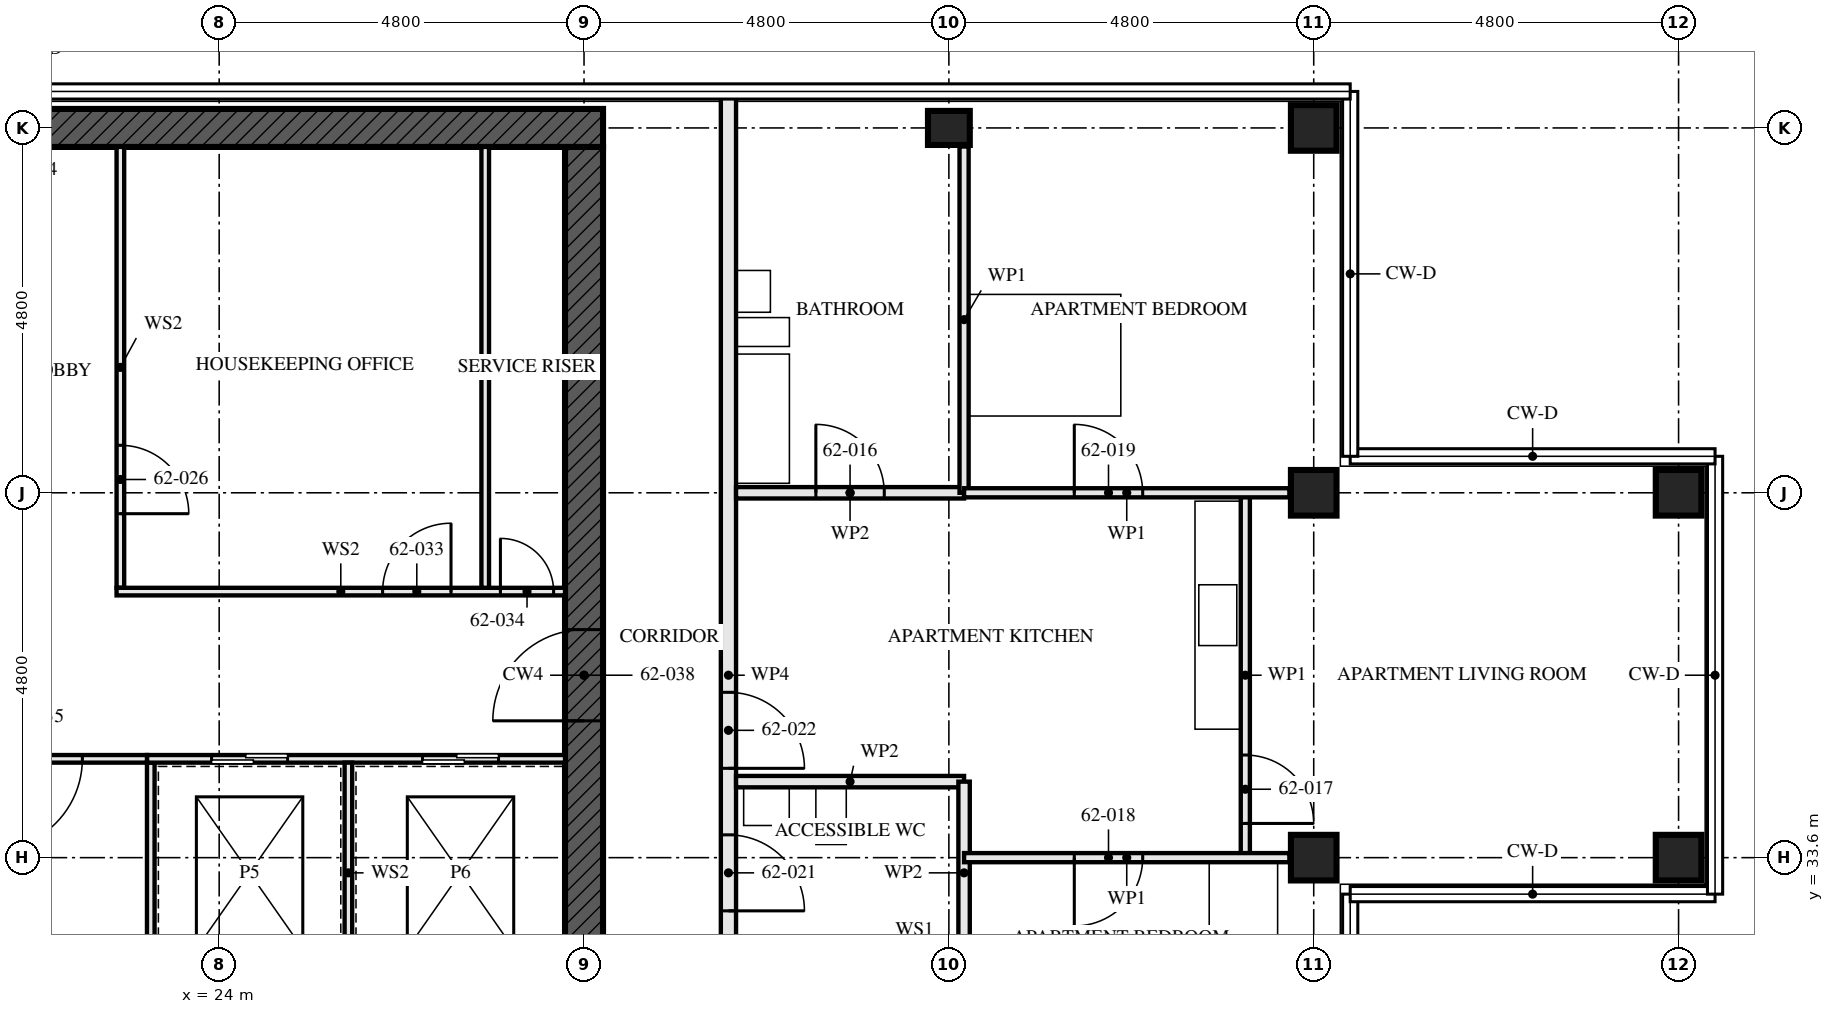
"""IFC4 building model, lengths in metres.
Left out: names, types, materials, properties, quantities, classifications, styles, units other than length and angle.
Written with IfcOpenShell. Run it as: python <this file> out.ifc"""

import sys

from ifc_helpers import new_model, si_unit, direction, frame, frame_2d, origin, origin_2d, place, context, subcontext, project, spatial, rectangle, hollow_rectangle, i_section, extrude, element, fill, save


model = new_model("IFC4")
c1 = context("Model", 3, precision=1e-05, world=origin(), true_north=direction((0.0, 1.0)))
c2 = subcontext(c1, "Body", "Model", "MODEL_VIEW")
j1 = project(units=[si_unit("LENGTHUNIT", "METRE"), si_unit("PLANEANGLEUNIT", "RADIAN")], contexts=[c1])
p1 = place(None, origin())
s1 = spatial("IfcSite", under=j1, at=p1, CompositionType="ELEMENT")
p2 = place(p1, origin())
s2 = spatial("IfcBuilding", under=s1, at=p2, CompositionType="ELEMENT")
p3 = place(p2, frame((0.0, 0.0, 226.0)))
s3 = spatial("IfcBuildingStorey", under=s2, at=p3, CompositionType="ELEMENT", Elevation=226.0)
p4 = place(p3, frame((33.6, 43.2, 0.0), z_axis=(0.0, 0.0, 1.0), x_axis=(0.0, 1.0, 0.0)))
e1 = element("IfcColumn", 1, at=p4, inside=s3, PredefinedType="COLUMN", context=c2, shape_type="SweptSolid", body=[
    extrude(i_section(OverallWidth=0.448, OverallDepth=0.55, WebThickness=0.072, FlangeThickness=0.115, FilletRadius=0.015, at=origin_2d()), origin(), (0.0, 0.0, 1.0), 3.5),
])
for number, where, z_axis, x_axis in (
    (2, (38.4, 33.6, 0.0), (0.0, 0.0, 1.0), (0.0, 1.0, 0.0)),
    (3, (38.4, 38.4, 0.0), (0.0, 0.0, 1.0), (0.0, 1.0, 0.0)),
    (4, (38.4, 43.2, 0.0), (0.0, 0.0, 1.0), (0.0, 1.0, 0.0)),
    (5, (43.2, 33.6, 0.0), (0.0, 0.0, 1.0), (0.0, 1.0, 0.0)),
    (6, (43.2, 38.4, 0.0), (0.0, 0.0, 1.0), (0.0, 1.0, 0.0)),
):
    element("IfcColumn", number, at=place(p3, frame(where, z_axis=z_axis, x_axis=x_axis)), inside=s3, PredefinedType="COLUMN", context=c2, shape_type="SweptSolid", body=[
        extrude(hollow_rectangle(XDim=0.6, YDim=0.6, WallThickness=0.05, at=origin_2d()), origin(), (0.0, 0.0, 1.0), 3.5),
    ])
p5 = place(p3, frame((29.05, 43.2, -0.17), z_axis=(0.0, 0.0, 1.0), x_axis=(-1.0, 0.0, 0.0)))
e7 = element("IfcWall", 7, at=p5, inside=s3, PredefinedType="SHEAR", context=c2, shape_type="SweptSolid", body=[
    extrude(rectangle(XDim=14.9, YDim=0.5, at=frame_2d((7.45, 0.0))), origin(), (0.0, 0.0, 1.0), 3.5),
])
p6 = place(p3, frame((28.8, 29.05, -0.17), z_axis=(0.0, 0.0, 1.0), x_axis=(0.0, 1.0, 0.0)))
e8 = element("IfcWall", 8, at=p6, inside=s3, PredefinedType="SHEAR", context=c2, shape_type="SweptSolid", body=[
    extrude(rectangle(XDim=13.9, YDim=0.5, at=frame_2d((6.95, 0.0))), origin(), (0.0, 0.0, 1.0), 3.5),
])
p7 = place(p6, frame((6.35, 0.0, 0.17)))
e9 = element("IfcOpeningElement", 9, at=p7, cuts=e8, PredefinedType="OPENING", context=c2, shape_type="SweptSolid", body=[
    extrude(rectangle(XDim=1.2, YDim=2.1, at=frame_2d((0.6, 1.05))), frame((0.0, 0.26, 0.0), z_axis=(0.0, -1.0, 0.0), x_axis=(1.0, 0.0, 0.0)), (0.0, 0.0, 1.0), 0.521),
])
p8 = place(p3, frame((33.8, 32.2, 0.0), z_axis=(0.0, 0.0, 1.0), x_axis=(0.0, 1.0, 0.0)))
e10 = element("IfcWall", 10, at=p8, inside=s3, PredefinedType="PARTITIONING", context=c2, shape_type="SweptSolid", body=[
    extrude(rectangle(XDim=2.4, YDim=0.15, at=frame_2d((1.2, 0.0))), origin(), (0.0, 0.0, 1.0), 2.55),
])
p9 = place(p3, frame((33.8, 34.6, 0.0), z_axis=(0.0, 0.0, 1.0), x_axis=(-1.0, 0.0, 0.0)))
e11 = element("IfcWall", 11, at=p9, inside=s3, PredefinedType="PARTITIONING", context=c2, shape_type="SweptSolid", body=[
    extrude(rectangle(XDim=3.0, YDim=0.15, at=frame_2d((1.5, 0.0))), origin(), (0.0, 0.0, 1.0), 3.33),
])
p10 = place(p3, frame((33.8, 38.4, 0.0), z_axis=(0.0, 0.0, 1.0), x_axis=(-1.0, 0.0, 0.0)))
e12 = element("IfcWall", 12, at=p10, inside=s3, PredefinedType="PARTITIONING", context=c2, shape_type="SweptSolid", body=[
    extrude(rectangle(XDim=3.0, YDim=0.15, at=frame_2d((1.5, 0.0))), origin(), (0.0, 0.0, 1.0), 2.55),
])
p11 = place(p10, frame((1.05, 0.0, 0.0)))
e13 = element("IfcOpeningElement", 13, at=p11, cuts=e12, PredefinedType="OPENING", context=c2, shape_type="SweptSolid", body=[
    extrude(rectangle(XDim=0.9, YDim=2.1, at=frame_2d((0.45, 1.05))), frame((0.0, 0.085, 0.0), z_axis=(0.0, -1.0, 0.0), x_axis=(1.0, 0.0, 0.0)), (0.0, 0.0, 1.0), 0.171),
])
p12 = place(p3, frame((37.5, 33.6, 0.0), z_axis=(0.0, 0.0, 1.0), x_axis=(0.0, 1.0, 0.0)))
e14 = element("IfcWall", 14, at=p12, inside=s3, PredefinedType="PARTITIONING", context=c2, shape_type="SweptSolid", body=[
    extrude(rectangle(XDim=4.8, YDim=0.12, at=frame_2d((2.4, 0.0))), origin(), (0.0, 0.0, 1.0), 3.33),
])
p13 = place(p12, frame((0.45, 0.0, 0.0)))
e15 = element("IfcOpeningElement", 15, at=p13, cuts=e14, PredefinedType="OPENING", context=c2, shape_type="SweptSolid", body=[
    extrude(rectangle(XDim=0.9, YDim=2.1, at=frame_2d((0.45, 1.05))), frame((0.0, 0.071, 0.0), z_axis=(0.0, -1.0, 0.0), x_axis=(1.0, 0.0, 0.0)), (0.0, 0.0, 1.0), 0.141),
])
p14 = place(p3, frame((33.8, 38.4, 0.0), z_axis=(0.0, 0.0, 1.0), x_axis=(0.0, 1.0, 0.0)))
e16 = element("IfcWall", 16, at=p14, inside=s3, PredefinedType="PARTITIONING", context=c2, shape_type="SweptSolid", body=[
    extrude(rectangle(XDim=4.556, YDim=0.12, at=frame_2d((2.278, 0.0))), origin(), (0.0, 0.0, 1.0), 3.33),
])
p15 = place(p3, frame((38.08, 33.6, 0.0), z_axis=(0.0, 0.0, 1.0), x_axis=(-1.0, 0.0, 0.0)))
e17 = element("IfcWall", 17, at=p15, inside=s3, PredefinedType="PARTITIONING", context=c2, shape_type="SweptSolid", body=[
    extrude(rectangle(XDim=4.28, YDim=0.12, at=frame_2d((2.14, 0.0))), origin(), (0.0, 0.0, 1.0), 2.55),
])
p16 = place(p15, frame((1.93, 0.0, 0.0)))
e18 = element("IfcOpeningElement", 18, at=p16, cuts=e17, PredefinedType="OPENING", context=c2, shape_type="SweptSolid", body=[
    extrude(rectangle(XDim=0.9, YDim=2.1, at=frame_2d((0.45, 1.05))), frame((0.0, 0.071, 0.0), z_axis=(0.0, -1.0, 0.0), x_axis=(1.0, 0.0, 0.0)), (0.0, 0.0, 1.0), 0.141),
])
p17 = place(p3, frame((38.08, 38.4, 0.0), z_axis=(0.0, 0.0, 1.0), x_axis=(-1.0, 0.0, 0.0)))
e19 = element("IfcWall", 19, at=p17, inside=s3, PredefinedType="PARTITIONING", context=c2, shape_type="SweptSolid", body=[
    extrude(rectangle(XDim=4.28, YDim=0.12, at=frame_2d((2.14, 0.0))), origin(), (0.0, 0.0, 1.0), 2.55),
])
p18 = place(p17, frame((1.93, 0.0, 0.0)))
e20 = element("IfcOpeningElement", 20, at=p18, cuts=e19, PredefinedType="OPENING", context=c2, shape_type="SweptSolid", body=[
    extrude(rectangle(XDim=0.9, YDim=2.1, at=frame_2d((0.45, 1.05))), frame((0.0, 0.071, 0.0), z_axis=(0.0, -1.0, 0.0), x_axis=(1.0, 0.0, 0.0)), (0.0, 0.0, 1.0), 0.141),
])
p19 = place(p3, frame((30.7, 28.345, 0.0), z_axis=(0.0, 0.0, 1.0), x_axis=(0.0, 1.0, 0.0)))
e21 = element("IfcWall", 21, at=p19, inside=s3, PredefinedType="PARTITIONING", context=c2, shape_type="SweptSolid", body=[
    extrude(rectangle(XDim=15.31, YDim=0.2, at=frame_2d((7.655, 0.0))), origin(), (0.0, 0.0, 1.0), 2.32),
])
p20 = place(p19, frame((1.855, 0.0, 0.0)))
e22 = element("IfcOpeningElement", 22, at=p20, cuts=e21, PredefinedType="OPENING", context=c2, shape_type="SweptSolid", body=[
    extrude(rectangle(XDim=1.0, YDim=2.1, at=frame_2d((0.5, 1.05))), frame((0.0, 0.111, 0.0), z_axis=(0.0, -1.0, 0.0), x_axis=(1.0, 0.0, 0.0)), (0.0, 0.0, 1.0), 0.221),
])
p21 = place(p19, frame((4.555, 0.0, 0.0)))
e23 = element("IfcOpeningElement", 23, at=p21, cuts=e21, PredefinedType="OPENING", context=c2, shape_type="SweptSolid", body=[
    extrude(rectangle(XDim=1.0, YDim=2.1, at=frame_2d((0.5, 1.05))), frame((0.0, 0.111, 0.0), z_axis=(0.0, -1.0, 0.0), x_axis=(1.0, 0.0, 0.0)), (0.0, 0.0, 1.0), 0.221),
])
p22 = place(p19, frame((6.43, 0.0, 0.0)))
e24 = element("IfcOpeningElement", 24, at=p22, cuts=e21, PredefinedType="OPENING", context=c2, shape_type="SweptSolid", body=[
    extrude(rectangle(XDim=1.0, YDim=2.1, at=frame_2d((0.5, 1.05))), frame((0.0, 0.111, 0.0), z_axis=(0.0, -1.0, 0.0), x_axis=(1.0, 0.0, 0.0)), (0.0, 0.0, 1.0), 0.221),
])
p23 = place(p3, frame((27.5, 37.15, 0.0), z_axis=(0.0, 0.0, 1.0), x_axis=(0.0, 1.0, 0.0)))
e25 = element("IfcWall", 25, at=p23, inside=s3, PredefinedType="SOLIDWALL", context=c2, shape_type="SweptSolid", body=[
    extrude(rectangle(XDim=5.8, YDim=0.1, at=frame_2d((2.9, 0.0))), origin(), (0.0, 0.0, 1.0), 3.33),
])
p24 = place(p3, frame((22.7, 37.15, 0.0), z_axis=(0.0, 0.0, 1.0), x_axis=(0.0, 1.0, 0.0)))
e26 = element("IfcWall", 26, at=p24, inside=s3, PredefinedType="SOLIDWALL", context=c2, shape_type="SweptSolid", body=[
    extrude(rectangle(XDim=5.8, YDim=0.1, at=frame_2d((2.9, 0.0))), origin(), (0.0, 0.0, 1.0), 3.33),
])
p25 = place(p24, frame((0.975, 0.0, 0.0)))
e27 = element("IfcOpeningElement", 27, at=p25, cuts=e26, PredefinedType="OPENING", context=c2, shape_type="SweptSolid", body=[
    extrude(rectangle(XDim=0.9, YDim=2.1, at=frame_2d((0.45, 1.05))), frame((0.0, 0.061, 0.0), z_axis=(0.0, -1.0, 0.0), x_axis=(1.0, 0.0, 0.0)), (0.0, 0.0, 1.0), 0.121),
])
p26 = place(p3, frame((23.1, 29.05, 0.0), z_axis=(0.0, 0.0, 1.0), x_axis=(0.0, 1.0, 0.0)))
e28 = element("IfcWall", 28, at=p26, inside=s3, PredefinedType="SOLIDWALL", context=c2, shape_type="SweptSolid", body=[
    extrude(rectangle(XDim=5.8, YDim=0.1, at=frame_2d((2.9, 0.0))), origin(), (0.0, 0.0, 1.0), 3.33),
])
p27 = place(p26, frame((1.0, 0.0, 0.0)))
e29 = element("IfcOpeningElement", 29, at=p27, cuts=e28, PredefinedType="OPENING", context=c2, shape_type="SweptSolid", body=[
    extrude(rectangle(XDim=0.7, YDim=2.1, at=frame_2d((0.35, 1.05))), frame((0.0, 0.061, 0.0), z_axis=(0.0, -1.0, 0.0), x_axis=(1.0, 0.0, 0.0)), (0.0, 0.0, 1.0), 0.121),
])
p28 = place(p3, frame((23.05, 34.9, 0.0), z_axis=(0.0, 0.0, 1.0), x_axis=(1.0, 0.0, 0.0)))
e30 = element("IfcWall", 30, at=p28, inside=s3, PredefinedType="SOLIDWALL", context=c2, shape_type="SweptSolid", body=[
    extrude(rectangle(XDim=5.5, YDim=0.1, at=frame_2d((2.75, 0.0))), origin(), (0.0, 0.0, 1.0), 3.33),
])
p29 = place(p28, frame((0.85, 0.0, 0.0)))
e31 = element("IfcOpeningElement", 31, at=p29, cuts=e30, PredefinedType="OPENING", context=c2, shape_type="SweptSolid", body=[
    extrude(rectangle(XDim=1.0, YDim=2.1, at=frame_2d((0.5, 1.05))), frame((0.0, 0.061, 0.0), z_axis=(0.0, -1.0, 0.0), x_axis=(1.0, 0.0, 0.0)), (0.0, 0.0, 1.0), 0.121),
])
p30 = place(p28, frame((3.625, 0.0, 0.0)))
e32 = element("IfcOpeningElement", 32, at=p30, cuts=e30, PredefinedType="OPENING", context=c2, shape_type="SweptSolid", body=[
    extrude(rectangle(XDim=1.0, YDim=2.1, at=frame_2d((0.5, 1.05))), frame((0.0, 0.061, 0.0), z_axis=(0.0, -1.0, 0.0), x_axis=(1.0, 0.0, 0.0)), (0.0, 0.0, 1.0), 0.121),
])
p31 = place(p3, frame((22.65, 37.1, 0.0), z_axis=(0.0, 0.0, 1.0), x_axis=(1.0, 0.0, 0.0)))
e33 = element("IfcWall", 33, at=p31, inside=s3, PredefinedType="SOLIDWALL", context=c2, shape_type="SweptSolid", body=[
    extrude(rectangle(XDim=5.9, YDim=0.1, at=frame_2d((2.95, 0.0))), origin(), (0.0, 0.0, 1.0), 3.33),
])
p32 = place(p31, frame((3.5, 0.0, 0.0)))
e34 = element("IfcOpeningElement", 34, at=p32, cuts=e33, PredefinedType="OPENING", context=c2, shape_type="SweptSolid", body=[
    extrude(rectangle(XDim=0.9, YDim=2.1, at=frame_2d((0.45, 1.05))), frame((0.0, 0.061, 0.0), z_axis=(0.0, -1.0, 0.0), x_axis=(1.0, 0.0, 0.0)), (0.0, 0.0, 1.0), 0.121),
])
p33 = place(p31, frame((5.05, 0.0, 0.0)))
e35 = element("IfcOpeningElement", 35, at=p33, cuts=e33, PredefinedType="OPENING", context=c2, shape_type="SweptSolid", body=[
    extrude(rectangle(XDim=0.7, YDim=2.1, at=frame_2d((0.35, 1.05))), frame((0.0, 0.061, 0.0), z_axis=(0.0, -1.0, 0.0), x_axis=(1.0, 0.0, 0.0)), (0.0, 0.0, 1.0), 0.121),
])
p34 = place(p3, frame((20.55, 34.9, 0.0), z_axis=(0.0, 0.0, 1.0), x_axis=(1.0, 0.0, 0.0)))
e36 = element("IfcWall", 36, at=p34, inside=s3, PredefinedType="SOLIDWALL", context=c2, shape_type="SweptSolid", body=[
    extrude(rectangle(XDim=2.5, YDim=0.1, at=frame_2d((1.25, 0.0))), origin(), (0.0, 0.0, 1.0), 3.33),
])
p35 = place(p34, frame((0.45, 0.0, 0.0)))
e37 = element("IfcOpeningElement", 37, at=p35, cuts=e36, PredefinedType="OPENING", context=c2, shape_type="SweptSolid", body=[
    extrude(rectangle(XDim=1.2, YDim=2.1, at=frame_2d((0.6, 1.05))), frame((0.0, 0.061, 0.0), z_axis=(0.0, -1.0, 0.0), x_axis=(1.0, 0.0, 0.0)), (0.0, 0.0, 1.0), 0.121),
])
p36 = place(p3, frame((25.7, 31.95, 0.0), z_axis=(0.0, 0.0, 1.0), x_axis=(0.0, 1.0, 0.0)))
e38 = element("IfcWall", 38, at=p36, inside=s3, PredefinedType="SOLIDWALL", context=c2, shape_type="SweptSolid", body=[
    extrude(rectangle(XDim=2.9, YDim=0.1, at=frame_2d((1.45, 0.0))), origin(), (0.0, 0.0, 1.0), 3.33),
])
p37 = place(p11, frame((0.9, 0.0, 0.0), z_axis=(0.0, 0.0, 1.0), x_axis=(-1.0, 0.0, 0.0)))
e39 = element("IfcDoor", 39, at=p37, inside=s3, OperationType="SINGLE_SWING_RIGHT", PredefinedType="DOOR", context=c2, shape_type="SweptSolid", body=[
    extrude(rectangle(XDim=0.9, YDim=2.1, at=frame_2d((0.45, 1.05))), frame((0.0, 0.022, 0.0), z_axis=(0.0, -1.0, 0.0), x_axis=(1.0, 0.0, 0.0)), (0.0, 0.0, 1.0), 0.044),
])
fill(e13, e39)
p38 = place(p13, frame((0.9, 0.0, 0.0), z_axis=(0.0, 0.0, 1.0), x_axis=(-1.0, 0.0, 0.0)))
e40 = element("IfcDoor", 40, at=p38, inside=s3, OperationType="SINGLE_SWING_LEFT", PredefinedType="DOOR", context=c2, shape_type="SweptSolid", body=[
    extrude(rectangle(XDim=0.9, YDim=2.1, at=frame_2d((0.45, 1.05))), frame((0.0, 0.022, 0.0), z_axis=(0.0, -1.0, 0.0), x_axis=(1.0, 0.0, 0.0)), (0.0, 0.0, 1.0), 0.044),
])
fill(e15, e40)
p39 = place(p16, origin())
e41 = element("IfcDoor", 41, at=p39, inside=s3, OperationType="SINGLE_SWING_LEFT", PredefinedType="DOOR", context=c2, shape_type="SweptSolid", body=[
    extrude(rectangle(XDim=0.9, YDim=2.1, at=frame_2d((0.45, 1.05))), frame((0.0, 0.022, 0.0), z_axis=(0.0, -1.0, 0.0), x_axis=(1.0, 0.0, 0.0)), (0.0, 0.0, 1.0), 0.044),
])
fill(e18, e41)
p40 = place(p18, frame((0.9, 0.0, 0.0), z_axis=(0.0, 0.0, 1.0), x_axis=(-1.0, 0.0, 0.0)))
e42 = element("IfcDoor", 42, at=p40, inside=s3, OperationType="SINGLE_SWING_RIGHT", PredefinedType="DOOR", context=c2, shape_type="SweptSolid", body=[
    extrude(rectangle(XDim=0.9, YDim=2.1, at=frame_2d((0.45, 1.05))), frame((0.0, 0.022, 0.0), z_axis=(0.0, -1.0, 0.0), x_axis=(1.0, 0.0, 0.0)), (0.0, 0.0, 1.0), 0.044),
])
fill(e20, e42)
p41 = place(p21, frame((1.0, 0.0, 0.0), z_axis=(0.0, 0.0, 1.0), x_axis=(-1.0, 0.0, 0.0)))
e43 = element("IfcDoor", 43, at=p41, inside=s3, OperationType="SINGLE_SWING_LEFT", PredefinedType="DOOR", context=c2, shape_type="SweptSolid", body=[
    extrude(rectangle(XDim=1.0, YDim=2.1, at=frame_2d((0.5, 1.05))), frame((0.0, 0.027, 0.0), z_axis=(0.0, -1.0, 0.0), x_axis=(1.0, 0.0, 0.0)), (0.0, 0.0, 1.0), 0.054),
])
fill(e23, e43)
p42 = place(p22, frame((1.0, 0.0, 0.0), z_axis=(0.0, 0.0, 1.0), x_axis=(-1.0, 0.0, 0.0)))
e44 = element("IfcDoor", 44, at=p42, inside=s3, OperationType="SINGLE_SWING_LEFT", PredefinedType="DOOR", context=c2, shape_type="SweptSolid", body=[
    extrude(rectangle(XDim=1.0, YDim=2.1, at=frame_2d((0.5, 1.05))), frame((0.0, 0.027, 0.0), z_axis=(0.0, -1.0, 0.0), x_axis=(1.0, 0.0, 0.0)), (0.0, 0.0, 1.0), 0.054),
])
fill(e24, e44)
p43 = place(p25, frame((0.9, 0.0, 0.0), z_axis=(0.0, 0.0, 1.0), x_axis=(-1.0, 0.0, 0.0)))
e45 = element("IfcDoor", 45, at=p43, inside=s3, OperationType="SINGLE_SWING_LEFT", PredefinedType="DOOR", context=c2, shape_type="SweptSolid", body=[
    extrude(rectangle(XDim=0.9, YDim=2.1, at=frame_2d((0.45, 1.05))), frame((0.0, 0.027, 0.0), z_axis=(0.0, -1.0, 0.0), x_axis=(1.0, 0.0, 0.0)), (0.0, 0.0, 1.0), 0.054),
])
fill(e27, e45)
p44 = place(p29, origin())
e46 = element("IfcDoor", 46, at=p44, inside=s3, OperationType="SLIDING_TO_LEFT", PredefinedType="DOOR", context=c2, shape_type="SweptSolid", body=[
    extrude(rectangle(XDim=1.0, YDim=2.1, at=frame_2d((0.5, 1.05))), frame((0.0, 0.05, 0.0), z_axis=(0.0, -1.0, 0.0), x_axis=(1.0, 0.0, 0.0)), (0.0, 0.0, 1.0), 0.1),
])
fill(e31, e46)
p45 = place(p30, origin())
e47 = element("IfcDoor", 47, at=p45, inside=s3, OperationType="SLIDING_TO_LEFT", PredefinedType="DOOR", context=c2, shape_type="SweptSolid", body=[
    extrude(rectangle(XDim=1.0, YDim=2.1, at=frame_2d((0.5, 1.05))), frame((0.0, 0.05, 0.0), z_axis=(0.0, -1.0, 0.0), x_axis=(1.0, 0.0, 0.0)), (0.0, 0.0, 1.0), 0.1),
])
fill(e32, e47)
p46 = place(p32, origin())
e48 = element("IfcDoor", 48, at=p46, inside=s3, OperationType="SINGLE_SWING_LEFT", PredefinedType="DOOR", context=c2, shape_type="SweptSolid", body=[
    extrude(rectangle(XDim=0.9, YDim=2.1, at=frame_2d((0.45, 1.05))), frame((0.0, 0.027, 0.0), z_axis=(0.0, -1.0, 0.0), x_axis=(1.0, 0.0, 0.0)), (0.0, 0.0, 1.0), 0.054),
])
fill(e34, e48)
p47 = place(p33, origin())
e49 = element("IfcDoor", 49, at=p47, inside=s3, OperationType="SINGLE_SWING_RIGHT", PredefinedType="DOOR", context=c2, shape_type="SweptSolid", body=[
    extrude(rectangle(XDim=0.7, YDim=2.1, at=frame_2d((0.35, 1.05))), frame((0.0, 0.027, 0.0), z_axis=(0.0, -1.0, 0.0), x_axis=(1.0, 0.0, 0.0)), (0.0, 0.0, 1.0), 0.054),
])
fill(e35, e49)
p48 = place(p35, frame((1.2, 0.0, 0.0), z_axis=(0.0, 0.0, 1.0), x_axis=(-1.0, 0.0, 0.0)))
e50 = element("IfcDoor", 50, at=p48, inside=s3, OperationType="SINGLE_SWING_LEFT", PredefinedType="DOOR", context=c2, shape_type="SweptSolid", body=[
    extrude(rectangle(XDim=1.2, YDim=2.1, at=frame_2d((0.6, 1.05))), frame((0.0, 0.027, 0.0), z_axis=(0.0, -1.0, 0.0), x_axis=(1.0, 0.0, 0.0)), (0.0, 0.0, 1.0), 0.054),
])
fill(e37, e50)
p49 = place(p7, origin())
e51 = element("IfcDoor", 51, at=p49, inside=s3, OperationType="SINGLE_SWING_LEFT", PredefinedType="DOOR", context=c2, shape_type="SweptSolid", body=[
    extrude(rectangle(XDim=1.2, YDim=2.1, at=frame_2d((0.6, 1.05))), frame((0.0, 0.027, 0.0), z_axis=(0.0, -1.0, 0.0), x_axis=(1.0, 0.0, 0.0)), (0.0, 0.0, 1.0), 0.054),
])
fill(e9, e51)
save(model, sys.argv[1])
